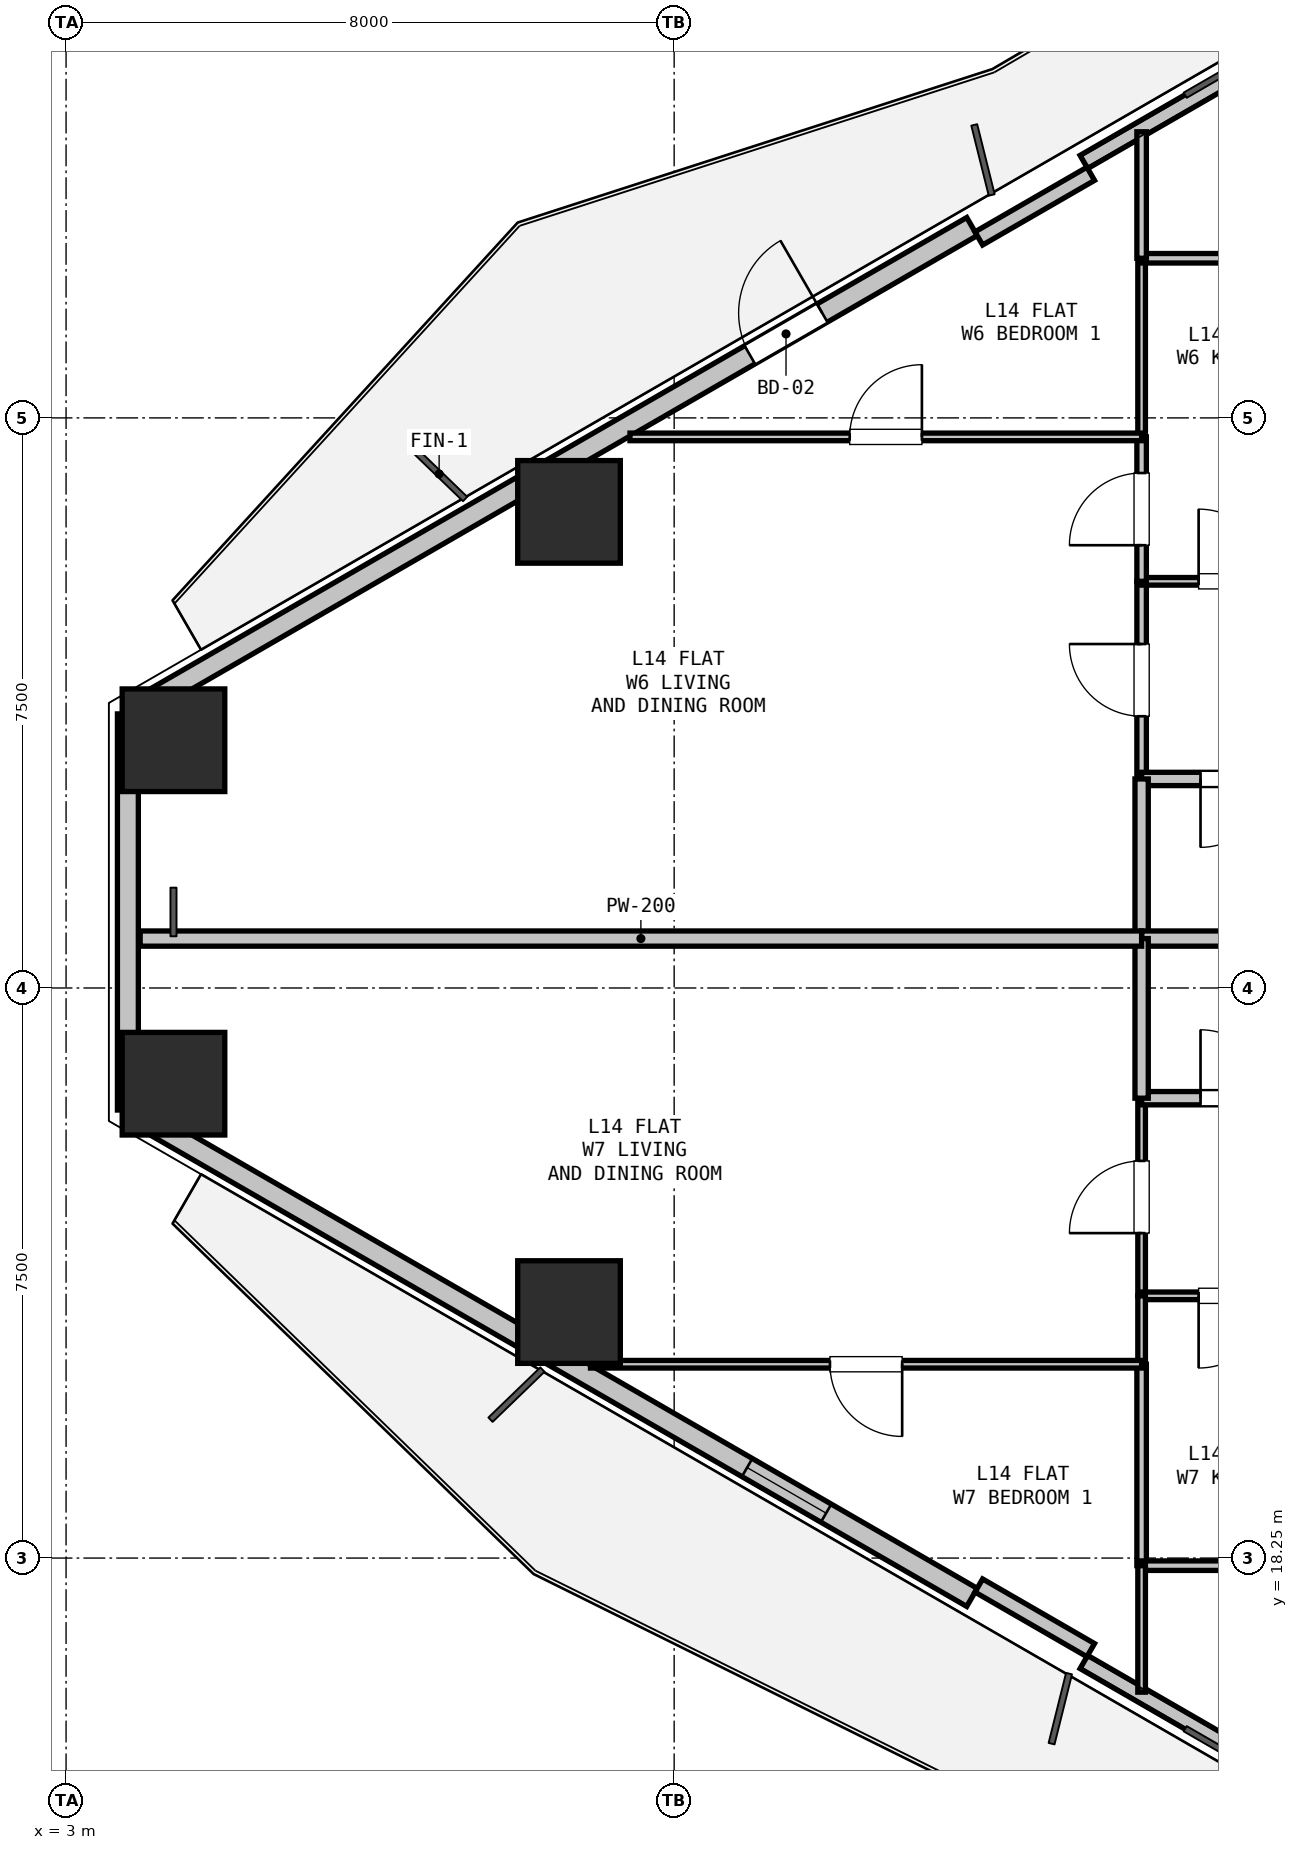
"""IFC4 building model, lengths in metres.
Left out: names, types, materials, properties, quantities, classifications, styles, units other than length and angle.
Written with IfcOpenShell. Run it as: python <this file> out.ifc"""

import sys

from ifc_helpers import new_model, si_unit, direction, frame, frame_2d, origin, origin_2d, place, context, subcontext, project, spatial, rectangle, hollow_rectangle, extrude, element, fill, save


model = new_model("IFC4")
c1 = context("Model", 3, precision=1e-05, world=origin(), true_north=direction((0.0, 1.0)))
c2 = subcontext(c1, "Body", "Model", "MODEL_VIEW")
j1 = project(units=[si_unit("LENGTHUNIT", "METRE"), si_unit("PLANEANGLEUNIT", "RADIAN")], contexts=[c1])
p1 = place(None, origin())
s1 = spatial("IfcSite", under=j1, at=p1, CompositionType="ELEMENT")
p2 = place(p1, origin())
s2 = spatial("IfcBuilding", under=s1, at=p2, CompositionType="ELEMENT")
p3 = place(p2, frame((0.0, 0.0, 52.2)))
s3 = spatial("IfcBuildingStorey", under=s2, at=p3, CompositionType="ELEMENT", Elevation=52.2)
for number, where, z_axis, x_axis in (
    (1, (4.413, 29.009, 0.0), (0.0, 0.0, 1.0), (1.0, 0.0, 0.0)),
    (2, (9.617, 32.014, 0.0), (0.0, 0.0, 1.0), (1.0, 0.0, 0.0)),
    (3, (9.617, 21.486, 0.0), (0.0, 0.0, 1.0), (1.0, 0.0, 0.0)),
    (4, (4.413, 24.491, 0.0), (0.0, 0.0, 1.0), (1.0, 0.0, 0.0)),
):
    element("IfcColumn", number, at=place(p3, frame(where, z_axis=z_axis, x_axis=x_axis)), inside=s3, PredefinedType="COLUMN", context=c2, shape_type="SweptSolid", body=[
        extrude(hollow_rectangle(XDim=1.35, YDim=1.35, WallThickness=0.036, at=origin_2d()), origin(), (0.0, 0.0, 1.0), 3.3),
    ])
p4 = place(p3, frame((3.813, 24.144, 0.0), z_axis=(0.0, 0.0, 1.0), x_axis=(0.0, 1.0, 0.0)))
e5 = element("IfcWall", 5, at=p4, inside=s3, PredefinedType="SOLIDWALL", context=c2, shape_type="SweptSolid", body=[
    extrude(rectangle(XDim=5.211, YDim=0.275, at=frame_2d((2.606, 0.0))), origin(), (0.0, 0.0, 1.0), 2.66),
])
p5 = place(p3, frame((3.943, 29.431, 0.0), z_axis=(0.0, 0.0, 1.0), x_axis=(0.866027105532, 0.499997052475, 0.0)))
e6 = element("IfcWall", 6, at=p5, inside=s3, PredefinedType="SOLIDWALL", context=c2, shape_type="SweptSolid", body=[
    extrude(rectangle(XDim=12.673, YDim=0.275, at=frame_2d((6.336, 0.0))), origin(), (0.0, 0.0, 1.0), 2.66),
])
p6 = place(p5, frame((9.298, 0.0, 0.0)))
e7 = element("IfcOpeningElement", 7, at=p6, cuts=e6, PredefinedType="OPENING", context=c2, shape_type="SweptSolid", body=[
    extrude(rectangle(XDim=1.1, YDim=2.1, at=frame_2d((0.55, 1.05))), frame((0.0, 0.147, 0.0), z_axis=(0.0, -1.0, 0.0), x_axis=(1.0, 0.0, 0.0)), (0.0, 0.0, 1.0), 0.295),
])
p7 = place(p3, frame((16.39, 36.617, 0.0), z_axis=(0.0, 0.0, 1.0), x_axis=(0.866027351828, 0.499996625875, 0.0)))
e8 = element("IfcWall", 8, at=p7, inside=s3, PredefinedType="PARAPET", context=c2, shape_type="SweptSolid", body=[
    extrude(rectangle(XDim=11.973, YDim=0.2, at=frame_2d((5.987, 0.0))), origin(), (0.0, 0.0, 1.0), 0.2),
])
p8 = place(p3, frame((15.008, 35.611, 0.0), z_axis=(0.0, 0.0, 1.0), x_axis=(0.86605165483, 0.499954529098, 0.0)))
e9 = element("IfcWall", 9, at=p8, inside=s3, PredefinedType="PARAPET", context=c2, shape_type="SweptSolid", body=[
    extrude(rectangle(XDim=1.7, YDim=0.2, at=frame_2d((0.85, 0.0))), origin(), (0.0, 0.0, 1.0), 2.66),
])
p9 = place(p3, frame((26.76, 10.896, 0.0), z_axis=(0.0, 0.0, 1.0), x_axis=(-0.866027351828, 0.499996625875, 0.0)))
e10 = element("IfcWall", 10, at=p9, inside=s3, PredefinedType="PARAPET", context=c2, shape_type="SweptSolid", body=[
    extrude(rectangle(XDim=11.973, YDim=0.2, at=frame_2d((5.987, 0.0))), origin(), (0.0, 0.0, 1.0), 0.2),
])
p10 = place(p3, frame((14.918, 17.733, 0.0), z_axis=(0.0, 0.0, 1.0), x_axis=(-0.866027105532, 0.499997052475, 0.0)))
e11 = element("IfcWall", 11, at=p10, inside=s3, PredefinedType="SOLIDWALL", context=c2, shape_type="SweptSolid", body=[
    extrude(rectangle(XDim=12.673, YDim=0.275, at=frame_2d((6.336, 0.0))), origin(), (0.0, 0.0, 1.0), 2.66),
])
p11 = place(p10, frame((2.216, 0.0, 0.9)))
e12 = element("IfcOpeningElement", 12, at=p11, cuts=e11, PredefinedType="OPENING", context=c2, shape_type="SweptSolid", body=[
    extrude(rectangle(XDim=1.2, YDim=1.4, at=frame_2d((0.6, 0.7))), frame((0.0, 0.147, 0.0), z_axis=(0.0, -1.0, 0.0), x_axis=(1.0, 0.0, 0.0)), (0.0, 0.0, 1.0), 0.295),
])
p12 = place(p3, frame((16.48, 17.039, 0.0), z_axis=(0.0, 0.0, 1.0), x_axis=(-0.86605165483, 0.499954529098, 0.0)))
e13 = element("IfcWall", 13, at=p12, inside=s3, PredefinedType="PARAPET", context=c2, shape_type="SweptSolid", body=[
    extrude(rectangle(XDim=1.7, YDim=0.2, at=frame_2d((0.85, 0.0))), origin(), (0.0, 0.0, 1.0), 2.66),
])
p13 = place(p3, frame((17.15, 28.5, 0.0), z_axis=(0.0, 0.0, 1.0), x_axis=(0.0, 1.0, 0.0)))
e14 = element("IfcWall", 14, at=p13, inside=s3, PredefinedType="PARTITIONING", context=c2, shape_type="SweptSolid", body=[
    extrude(rectangle(XDim=2.6, YDim=0.125, at=frame_2d((1.3, 0.0))), origin(), (0.0, 0.0, 1.0), 3.04),
])
p14 = place(p13, frame((0.825, 0.0, 0.0)))
e15 = element("IfcOpeningElement", 15, at=p14, cuts=e14, PredefinedType="OPENING", context=c2, shape_type="SweptSolid", body=[
    extrude(rectangle(XDim=0.95, YDim=2.1, at=frame_2d((0.475, 1.05))), frame((0.0, 0.073, 0.0), z_axis=(0.0, -1.0, 0.0), x_axis=(1.0, 0.0, 0.0)), (0.0, 0.0, 1.0), 0.145),
])
p15 = place(p3, frame((17.15, 31.1, 0.0), z_axis=(0.0, 0.0, 1.0), x_axis=(1.0, 0.0, 0.0)))
e16 = element("IfcWall", 16, at=p15, inside=s3, PredefinedType="PARTITIONING", context=c2, shape_type="SweptSolid", body=[
    extrude(rectangle(XDim=2.45, YDim=0.1, at=frame_2d((1.225, 0.0))), origin(), (0.0, 0.0, 1.0), 3.04),
])
p16 = place(p15, frame((0.75, 0.0, 0.0)))
e17 = element("IfcOpeningElement", 17, at=p16, cuts=e16, PredefinedType="OPENING", context=c2, shape_type="SweptSolid", body=[
    extrude(rectangle(XDim=0.95, YDim=2.1, at=frame_2d((0.475, 1.05))), frame((0.0, 0.06, 0.0), z_axis=(0.0, -1.0, 0.0), x_axis=(1.0, 0.0, 0.0)), (0.0, 0.0, 1.0), 0.12),
])
p17 = place(p3, frame((19.6, 28.5, 0.0), z_axis=(0.0, 0.0, 1.0), x_axis=(-1.0, 0.0, 0.0)))
e18 = element("IfcWall", 18, at=p17, inside=s3, PredefinedType="PLUMBINGWALL", context=c2, shape_type="SweptSolid", body=[
    extrude(rectangle(XDim=2.45, YDim=0.175, at=frame_2d((1.225, 0.0))), origin(), (0.0, 0.0, 1.0), 3.04),
])
p18 = place(p17, frame((0.775, 0.0, 0.0)))
e19 = element("IfcOpeningElement", 19, at=p18, cuts=e18, PredefinedType="OPENING", context=c2, shape_type="SweptSolid", body=[
    extrude(rectangle(XDim=0.9, YDim=2.1, at=frame_2d((0.45, 1.05))), frame((0.0, 0.097, 0.0), z_axis=(0.0, -1.0, 0.0), x_axis=(1.0, 0.0, 0.0)), (0.0, 0.0, 1.0), 0.195),
])
p19 = place(p3, frame((17.15, 21.7, 0.0), z_axis=(0.0, 0.0, 1.0), x_axis=(0.0, 1.0, 0.0)))
e20 = element("IfcWall", 20, at=p19, inside=s3, PredefinedType="PARTITIONING", context=c2, shape_type="SweptSolid", body=[
    extrude(rectangle(XDim=2.6, YDim=0.1, at=frame_2d((1.3, 0.0))), origin(), (0.0, 0.0, 1.0), 3.04),
])
p20 = place(p19, frame((0.825, 0.0, 0.0)))
e21 = element("IfcOpeningElement", 21, at=p20, cuts=e20, PredefinedType="OPENING", context=c2, shape_type="SweptSolid", body=[
    extrude(rectangle(XDim=0.95, YDim=2.1, at=frame_2d((0.475, 1.05))), frame((0.0, 0.06, 0.0), z_axis=(0.0, -1.0, 0.0), x_axis=(1.0, 0.0, 0.0)), (0.0, 0.0, 1.0), 0.12),
])
p21 = place(p3, frame((17.15, 24.3, 0.0), z_axis=(0.0, 0.0, 1.0), x_axis=(1.0, 0.0, 0.0)))
e22 = element("IfcWall", 22, at=p21, inside=s3, PredefinedType="PLUMBINGWALL", context=c2, shape_type="SweptSolid", body=[
    extrude(rectangle(XDim=2.45, YDim=0.175, at=frame_2d((1.225, 0.0))), origin(), (0.0, 0.0, 1.0), 3.04),
])
p22 = place(p21, frame((0.775, 0.0, 0.0)))
e23 = element("IfcOpeningElement", 23, at=p22, cuts=e22, PredefinedType="OPENING", context=c2, shape_type="SweptSolid", body=[
    extrude(rectangle(XDim=0.9, YDim=2.1, at=frame_2d((0.45, 1.05))), frame((0.0, 0.097, 0.0), z_axis=(0.0, -1.0, 0.0), x_axis=(1.0, 0.0, 0.0)), (0.0, 0.0, 1.0), 0.195),
])
p23 = place(p3, frame((19.6, 21.7, 0.0), z_axis=(0.0, 0.0, 1.0), x_axis=(-1.0, 0.0, 0.0)))
e24 = element("IfcWall", 24, at=p23, inside=s3, PredefinedType="PARTITIONING", context=c2, shape_type="SweptSolid", body=[
    extrude(rectangle(XDim=2.45, YDim=0.1, at=frame_2d((1.225, 0.0))), origin(), (0.0, 0.0, 1.0), 2.338),
])
p24 = place(p23, frame((0.75, 0.0, 0.0)))
e25 = element("IfcOpeningElement", 25, at=p24, cuts=e24, PredefinedType="OPENING", context=c2, shape_type="SweptSolid", body=[
    extrude(rectangle(XDim=0.95, YDim=2.1, at=frame_2d((0.475, 1.05))), frame((0.0, 0.06, 0.0), z_axis=(0.0, -1.0, 0.0), x_axis=(1.0, 0.0, 0.0)), (0.0, 0.0, 1.0), 0.12),
])
p25 = place(p3, frame((17.15, 26.4, 0.0), z_axis=(0.0, 0.0, 1.0), x_axis=(0.0, 1.0, 0.0)))
e26 = element("IfcWall", 26, at=p25, inside=s3, PredefinedType="PLUMBINGWALL", context=c2, shape_type="SweptSolid", body=[
    extrude(rectangle(XDim=2.1, YDim=0.175, at=frame_2d((1.05, 0.0))), origin(), (0.0, 0.0, 1.0), 3.04),
])
p26 = place(p3, frame((19.6, 26.4, 0.0), z_axis=(0.0, 0.0, 1.0), x_axis=(-1.0, 0.0, 0.0)))
e27 = element("IfcWall", 27, at=p26, inside=s3, PredefinedType="PARTITIONING", context=c2, shape_type="SweptSolid", body=[
    extrude(rectangle(XDim=2.45, YDim=0.2, at=frame_2d((1.225, 0.0))), origin(), (0.0, 0.0, 1.0), 3.04),
])
p27 = place(p3, frame((17.15, 31.1, 0.0), z_axis=(0.0, 0.0, 1.0), x_axis=(0.0, 1.0, 0.0)))
e28 = element("IfcWall", 28, at=p27, inside=s3, PredefinedType="PARTITIONING", context=c2, shape_type="SweptSolid", body=[
    extrude(rectangle(XDim=1.9, YDim=0.125, at=frame_2d((0.95, 0.0))), origin(), (0.0, 0.0, 1.0), 2.338),
])
p28 = place(p27, frame((0.475, 0.0, 0.0)))
e29 = element("IfcOpeningElement", 29, at=p28, cuts=e28, PredefinedType="OPENING", context=c2, shape_type="SweptSolid", body=[
    extrude(rectangle(XDim=0.95, YDim=2.1, at=frame_2d((0.475, 1.05))), frame((0.0, 0.073, 0.0), z_axis=(0.0, -1.0, 0.0), x_axis=(1.0, 0.0, 0.0)), (0.0, 0.0, 1.0), 0.145),
])
p29 = place(p3, frame((17.15, 33.0, 0.0), z_axis=(0.0, 0.0, 1.0), x_axis=(0.0, 1.0, 0.0)))
e30 = element("IfcWall", 30, at=p29, inside=s3, PredefinedType="PARTITIONING", context=c2, shape_type="SweptSolid", body=[
    extrude(rectangle(XDim=2.35, YDim=0.1, at=frame_2d((1.175, 0.0))), origin(), (0.0, 0.0, 1.0), 3.04),
])
p30 = place(p3, frame((17.15, 35.35, 0.0), z_axis=(0.0, 0.0, 1.0), x_axis=(1.0, 0.0, 0.0)))
e31 = element("IfcWall", 31, at=p30, inside=s3, PredefinedType="PARTITIONING", context=c2, shape_type="SweptSolid", body=[
    extrude(rectangle(XDim=2.45, YDim=0.125, at=frame_2d((1.225, 0.0))), origin(), (0.0, 0.0, 1.0), 3.04),
])
p31 = place(p3, frame((17.15, 24.3, 0.0), z_axis=(0.0, 0.0, 1.0), x_axis=(0.0, 1.0, 0.0)))
e32 = element("IfcWall", 32, at=p31, inside=s3, PredefinedType="PLUMBINGWALL", context=c2, shape_type="SweptSolid", body=[
    extrude(rectangle(XDim=2.1, YDim=0.175, at=frame_2d((1.05, 0.0))), origin(), (0.0, 0.0, 1.0), 3.04),
])
p32 = place(p3, frame((17.15, 18.15, 0.0), z_axis=(0.0, 0.0, 1.0), x_axis=(0.0, 1.0, 0.0)))
e33 = element("IfcWall", 33, at=p32, inside=s3, PredefinedType="PARTITIONING", context=c2, shape_type="SweptSolid", body=[
    extrude(rectangle(XDim=2.65, YDim=0.125, at=frame_2d((1.325, 0.0))), origin(), (0.0, 0.0, 1.0), 3.04),
])
p33 = place(p3, frame((17.15, 20.8, 0.0), z_axis=(0.0, 0.0, 1.0), x_axis=(0.0, 1.0, 0.0)))
e34 = element("IfcWall", 34, at=p33, inside=s3, PredefinedType="PARTITIONING", context=c2, shape_type="SweptSolid", body=[
    extrude(rectangle(XDim=0.9, YDim=0.1, at=frame_2d((0.45, 0.0))), origin(), (0.0, 0.0, 1.0), 2.338),
])
p34 = place(p3, frame((19.6, 18.15, 0.0), z_axis=(0.0, 0.0, 1.0), x_axis=(-1.0, 0.0, 0.0)))
e35 = element("IfcWall", 35, at=p34, inside=s3, PredefinedType="PARTITIONING", context=c2, shape_type="SweptSolid", body=[
    extrude(rectangle(XDim=2.45, YDim=0.125, at=frame_2d((1.225, 0.0))), origin(), (0.0, 0.0, 1.0), 3.04),
])
p35 = place(p3, frame((10.419, 33.0, 0.0), z_axis=(0.0, 0.0, 1.0), x_axis=(1.0, 0.0, 0.0)))
e36 = element("IfcWall", 36, at=p35, inside=s3, PredefinedType="PARTITIONING", context=c2, shape_type="SweptSolid", body=[
    extrude(rectangle(XDim=6.731, YDim=0.1, at=frame_2d((3.365, 0.0))), origin(), (0.0, 0.0, 1.0), 2.365),
])
p36 = place(p35, frame((2.89, 0.0, 0.0)))
e37 = element("IfcOpeningElement", 37, at=p36, cuts=e36, PredefinedType="OPENING", context=c2, shape_type="SweptSolid", body=[
    extrude(rectangle(XDim=0.95, YDim=2.1, at=frame_2d((0.475, 1.05))), frame((0.0, 0.06, 0.0), z_axis=(0.0, -1.0, 0.0), x_axis=(1.0, 0.0, 0.0)), (0.0, 0.0, 1.0), 0.12),
])
p37 = place(p3, frame((17.15, 26.4, 0.0), z_axis=(0.0, 0.0, 1.0), x_axis=(-1.0, 0.0, 0.0)))
e38 = element("IfcWall", 38, at=p37, inside=s3, PredefinedType="PARTITIONING", context=c2, shape_type="SweptSolid", body=[
    extrude(rectangle(XDim=13.175, YDim=0.2, at=frame_2d((6.588, 0.0))), origin(), (0.0, 0.0, 1.0), 2.65),
])
p38 = place(p3, frame((3.813, 29.356, 0.0), z_axis=(0.0, 0.0, 1.0), x_axis=(0.866131372301, 0.499816412211, 0.0)))
e39 = element("IfcWall", 39, at=p38, inside=s3, PredefinedType="PARTITIONING", context=c2, shape_type="SweptSolid", body=[
    extrude(rectangle(XDim=0.15, YDim=0.1, at=frame_2d((0.075, 0.0))), origin(), (0.0, 0.0, 1.0), 3.04),
])
p39 = place(p3, frame((17.15, 37.014, 0.0), z_axis=(0.0, 0.0, 1.0), x_axis=(0.0, -1.0, 0.0)))
e40 = element("IfcWall", 40, at=p39, inside=s3, PredefinedType="PARTITIONING", context=c2, shape_type="SweptSolid", body=[
    extrude(rectangle(XDim=1.664, YDim=0.125, at=frame_2d((0.832, 0.0))), origin(), (0.0, 0.0, 1.0), 2.365),
])
p40 = place(p3, frame((17.15, 20.8, 0.0), z_axis=(0.0, 0.0, 1.0), x_axis=(-1.0, 0.0, 0.0)))
e41 = element("IfcWall", 41, at=p40, inside=s3, PredefinedType="PARTITIONING", context=c2, shape_type="SweptSolid", body=[
    extrude(rectangle(XDim=7.25, YDim=0.1, at=frame_2d((3.625, 0.0))), origin(), (0.0, 0.0, 1.0), 2.365),
])
p41 = place(p40, frame((3.15, 0.0, 0.0)))
e42 = element("IfcOpeningElement", 42, at=p41, cuts=e41, PredefinedType="OPENING", context=c2, shape_type="SweptSolid", body=[
    extrude(rectangle(XDim=0.95, YDim=2.1, at=frame_2d((0.475, 1.05))), frame((0.0, 0.06, 0.0), z_axis=(0.0, -1.0, 0.0), x_axis=(1.0, 0.0, 0.0)), (0.0, 0.0, 1.0), 0.12),
])
p42 = place(p3, frame((3.943, 24.069, 0.0), z_axis=(0.0, 0.0, 1.0), x_axis=(-0.866131372301, 0.499816412211, 0.0)))
e43 = element("IfcWall", 43, at=p42, inside=s3, PredefinedType="PARTITIONING", context=c2, shape_type="SweptSolid", body=[
    extrude(rectangle(XDim=0.15, YDim=0.125, at=frame_2d((0.075, 0.0))), origin(), (0.0, 0.0, 1.0), 3.04),
])
p43 = place(p3, frame((17.15, 18.15, 0.0), z_axis=(0.0, 0.0, 1.0), x_axis=(0.0, -1.0, 0.0)))
e44 = element("IfcWall", 44, at=p43, inside=s3, PredefinedType="PARTITIONING", context=c2, shape_type="SweptSolid", body=[
    extrude(rectangle(XDim=1.664, YDim=0.1, at=frame_2d((0.832, 0.0))), origin(), (0.0, 0.0, 1.0), 2.365),
])
p44 = place(p6, origin())
e45 = element("IfcDoor", 45, at=p44, inside=s3, OperationType="SINGLE_SWING_RIGHT", PredefinedType="DOOR", context=c2, shape_type="SweptSolid", body=[
    extrude(rectangle(XDim=1.1, YDim=2.1, at=frame_2d((0.55, 1.05))), frame((0.0, 0.025, 0.0), z_axis=(0.0, -1.0, 0.0), x_axis=(1.0, 0.0, 0.0)), (0.0, 0.0, 1.0), 0.05),
])
fill(e7, e45)
p45 = place(p11, origin())
e46 = element("IfcWindow", 46, at=p45, inside=s3, PartitioningType="SINGLE_PANEL", PredefinedType="WINDOW", context=c2, shape_type="SweptSolid", body=[
    extrude(rectangle(XDim=1.2, YDim=1.4, at=frame_2d((0.6, 0.7))), frame((0.0, 0.03, 0.0), z_axis=(0.0, -1.0, 0.0), x_axis=(1.0, 0.0, 0.0)), (0.0, 0.0, 1.0), 0.06),
])
fill(e12, e46)
p46 = place(p18, origin())
e47 = element("IfcDoor", 47, at=p46, inside=s3, OperationType="SINGLE_SWING_RIGHT", PredefinedType="DOOR", context=c2, shape_type="SweptSolid", body=[
    extrude(rectangle(XDim=0.9, YDim=2.1, at=frame_2d((0.45, 1.05))), frame((0.0, 0.025, 0.0), z_axis=(0.0, -1.0, 0.0), x_axis=(1.0, 0.0, 0.0)), (0.0, 0.0, 1.0), 0.05),
])
fill(e19, e47)
p47 = place(p16, origin())
e48 = element("IfcDoor", 48, at=p47, inside=s3, OperationType="SINGLE_SWING_LEFT", PredefinedType="DOOR", context=c2, shape_type="SweptSolid", body=[
    extrude(rectangle(XDim=0.95, YDim=2.1, at=frame_2d((0.475, 1.05))), frame((0.0, 0.025, 0.0), z_axis=(0.0, -1.0, 0.0), x_axis=(1.0, 0.0, 0.0)), (0.0, 0.0, 1.0), 0.05),
])
fill(e17, e48)
p48 = place(p14, origin())
e49 = element("IfcDoor", 49, at=p48, inside=s3, OperationType="SINGLE_SWING_RIGHT", PredefinedType="DOOR", context=c2, shape_type="SweptSolid", body=[
    extrude(rectangle(XDim=0.95, YDim=2.1, at=frame_2d((0.475, 1.05))), frame((0.0, 0.025, 0.0), z_axis=(0.0, -1.0, 0.0), x_axis=(1.0, 0.0, 0.0)), (0.0, 0.0, 1.0), 0.05),
])
fill(e15, e49)
p49 = place(p22, origin())
e50 = element("IfcDoor", 50, at=p49, inside=s3, OperationType="SINGLE_SWING_LEFT", PredefinedType="DOOR", context=c2, shape_type="SweptSolid", body=[
    extrude(rectangle(XDim=0.9, YDim=2.1, at=frame_2d((0.45, 1.05))), frame((0.0, 0.025, 0.0), z_axis=(0.0, -1.0, 0.0), x_axis=(1.0, 0.0, 0.0)), (0.0, 0.0, 1.0), 0.05),
])
fill(e23, e50)
p50 = place(p24, origin())
e51 = element("IfcDoor", 51, at=p50, inside=s3, OperationType="SINGLE_SWING_RIGHT", PredefinedType="DOOR", context=c2, shape_type="SweptSolid", body=[
    extrude(rectangle(XDim=0.95, YDim=2.1, at=frame_2d((0.475, 1.05))), frame((0.0, 0.025, 0.0), z_axis=(0.0, -1.0, 0.0), x_axis=(1.0, 0.0, 0.0)), (0.0, 0.0, 1.0), 0.05),
])
fill(e25, e51)
p51 = place(p20, origin())
e52 = element("IfcDoor", 52, at=p51, inside=s3, OperationType="SINGLE_SWING_LEFT", PredefinedType="DOOR", context=c2, shape_type="SweptSolid", body=[
    extrude(rectangle(XDim=0.95, YDim=2.1, at=frame_2d((0.475, 1.05))), frame((0.0, 0.025, 0.0), z_axis=(0.0, -1.0, 0.0), x_axis=(1.0, 0.0, 0.0)), (0.0, 0.0, 1.0), 0.05),
])
fill(e21, e52)
p52 = place(p28, origin())
e53 = element("IfcDoor", 53, at=p52, inside=s3, OperationType="SINGLE_SWING_LEFT", PredefinedType="DOOR", context=c2, shape_type="SweptSolid", body=[
    extrude(rectangle(XDim=0.95, YDim=2.1, at=frame_2d((0.475, 1.05))), frame((0.0, 0.025, 0.0), z_axis=(0.0, -1.0, 0.0), x_axis=(1.0, 0.0, 0.0)), (0.0, 0.0, 1.0), 0.05),
])
fill(e29, e53)
p53 = place(p36, origin())
e54 = element("IfcDoor", 54, at=p53, inside=s3, OperationType="SINGLE_SWING_RIGHT", PredefinedType="DOOR", context=c2, shape_type="SweptSolid", body=[
    extrude(rectangle(XDim=0.95, YDim=2.1, at=frame_2d((0.475, 1.05))), frame((0.0, 0.025, 0.0), z_axis=(0.0, -1.0, 0.0), x_axis=(1.0, 0.0, 0.0)), (0.0, 0.0, 1.0), 0.05),
])
fill(e37, e54)
p54 = place(p41, origin())
e55 = element("IfcDoor", 55, at=p54, inside=s3, OperationType="SINGLE_SWING_LEFT", PredefinedType="DOOR", context=c2, shape_type="SweptSolid", body=[
    extrude(rectangle(XDim=0.95, YDim=2.1, at=frame_2d((0.475, 1.05))), frame((0.0, 0.025, 0.0), z_axis=(0.0, -1.0, 0.0), x_axis=(1.0, 0.0, 0.0)), (0.0, 0.0, 1.0), 0.05),
])
fill(e42, e55)
save(model, sys.argv[1])
